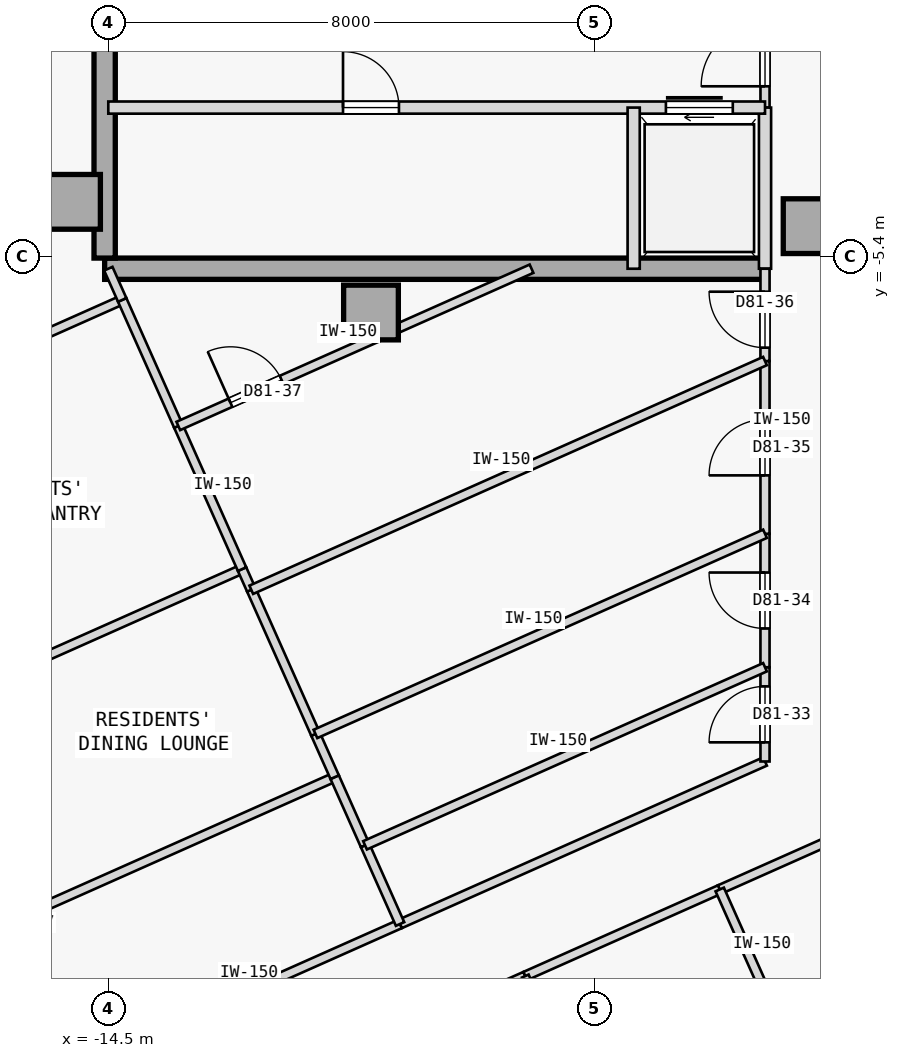
"""IFC4 building model, lengths in metres.
Left out: names, types, materials, properties, quantities, classifications, styles, units other than length and angle.
Written with IfcOpenShell. Run it as: python <this file> out.ifc"""

import sys

from ifc_helpers import new_model, si_unit, direction, frame, frame_2d, origin, origin_2d, place, context, subcontext, project, spatial, rectangle, extrude, element, fill, save


model = new_model("IFC4")
c1 = context("Model", 3, precision=1e-05, world=origin(), true_north=direction((0.0, 1.0)))
c2 = subcontext(c1, "Body", "Model", "MODEL_VIEW")
j1 = project(units=[si_unit("LENGTHUNIT", "METRE"), si_unit("PLANEANGLEUNIT", "RADIAN")], contexts=[c1])
p1 = place(None, origin())
s1 = spatial("IfcSite", under=j1, at=p1, CompositionType="ELEMENT")
p2 = place(p1, origin())
s2 = spatial("IfcBuilding", under=s1, at=p2, CompositionType="ELEMENT")
p3 = place(p2, frame((0.0, 0.0, 302.0)))
s3 = spatial("IfcBuildingStorey", under=s2, at=p3, CompositionType="ELEMENT", Elevation=302.0)
for number, where, z_axis, x_axis in (
    (1, (-15.08, -4.5, 0.0), (0.0, 0.0, 1.0), (1.0, 0.0, 0.0)),
    (2, (-10.18, -6.32, 0.0), (0.0, 0.0, 1.0), (1.0, 0.0, 0.0)),
    (3, (-2.95, -4.9, 0.0), (0.0, 0.0, 1.0), (1.0, 0.0, 0.0)),
):
    element("IfcColumn", number, at=place(p3, frame(where, z_axis=z_axis, x_axis=x_axis)), inside=s3, PredefinedType="COLUMN", context=c2, shape_type="SweptSolid", body=[
        extrude(rectangle(XDim=0.9, YDim=0.9, at=origin_2d()), origin(), (0.0, 0.0, 1.0), 3.55),
    ])
p4 = place(p3, frame((-14.56, -5.6, 0.0), z_axis=(0.0, 0.0, 1.0), x_axis=(1.0, 0.0, 0.0)))
e4 = element("IfcWall", 4, at=p4, inside=s3, PredefinedType="SHEAR", context=c2, shape_type="SweptSolid", body=[
    extrude(rectangle(XDim=10.86, YDim=0.35, at=frame_2d((5.43, 0.0))), origin(), (0.0, 0.0, 1.0), 3.145),
])
p5 = place(p3, frame((-14.56, -5.425, 0.0), z_axis=(0.0, 0.0, 1.0), x_axis=(0.0, 1.0, 0.0)))
e5 = element("IfcWall", 5, at=p5, inside=s3, PredefinedType="SHEAR", context=c2, shape_type="SweptSolid", body=[
    extrude(rectangle(XDim=10.85, YDim=0.35, at=frame_2d((5.425, 0.0))), origin(), (0.0, 0.0, 1.0), 3.145),
])
p6 = place(p3, frame((-3.7, -2.95, 0.0), z_axis=(0.0, 0.0, 1.0), x_axis=(0.0, 1.0, 0.0)))
e6 = element("IfcWall", 6, at=p6, inside=s3, PredefinedType="PARTITIONING", context=c2, shape_type="SweptSolid", body=[
    extrude(rectangle(XDim=1.8, YDim=0.15, at=frame_2d((0.9, 0.0))), origin(), (0.0, 0.0, 1.0), 3.145),
])
p7 = place(p6, frame((0.35, 0.0, 0.0)))
e7 = element("IfcOpeningElement", 7, at=p7, cuts=e6, PredefinedType="OPENING", context=c2, shape_type="SweptSolid", body=[
    extrude(rectangle(XDim=1.05, YDim=2.18, at=frame_2d((0.525, 1.09))), frame((0.0, 0.085, 0.0), z_axis=(0.0, -1.0, 0.0), x_axis=(1.0, 0.0, 0.0)), (0.0, 0.0, 1.0), 0.17),
])
p8 = place(p3, frame((-3.7, -5.6, 0.0), z_axis=(0.0, 0.0, 1.0), x_axis=(0.0, 1.0, 0.0)))
e8 = element("IfcWall", 8, at=p8, inside=s3, PredefinedType="STANDARD", context=c2, shape_type="SweptSolid", body=[
    extrude(rectangle(XDim=2.65, YDim=0.2, at=frame_2d((1.325, 0.0))), origin(), (0.0, 0.0, 1.0), 3.145),
])
p9 = place(p3, frame((-14.5, -2.95, 0.0), z_axis=(0.0, 0.0, 1.0), x_axis=(1.0, 0.0, 0.0)))
e9 = element("IfcWall", 9, at=p9, inside=s3, PredefinedType="STANDARD", context=c2, shape_type="SweptSolid", body=[
    extrude(rectangle(XDim=10.8, YDim=0.2, at=frame_2d((5.4, 0.0))), origin(), (0.0, 0.0, 1.0), 3.145),
])
p10 = place(p9, frame((9.17, 0.0, 0.0)))
e10 = element("IfcOpeningElement", 10, at=p10, cuts=e9, PredefinedType="OPENING", context=c2, shape_type="SweptSolid", body=[
    extrude(rectangle(XDim=1.1, YDim=2.15, at=frame_2d((0.55, 1.075))), frame((0.0, 0.11, 0.0), z_axis=(0.0, -1.0, 0.0), x_axis=(1.0, 0.0, 0.0)), (0.0, 0.0, 1.0), 0.22),
])
p11 = place(p9, frame((3.86, 0.0, 0.0)))
e11 = element("IfcOpeningElement", 11, at=p11, cuts=e9, PredefinedType="OPENING", context=c2, shape_type="SweptSolid", body=[
    extrude(rectangle(XDim=0.92, YDim=2.04, at=frame_2d((0.46, 1.02))), frame((0.0, 0.11, 0.0), z_axis=(0.0, -1.0, 0.0), x_axis=(1.0, 0.0, 0.0)), (0.0, 0.0, 1.0), 0.22),
])
p12 = place(p3, frame((-5.86, -5.6, 0.0), z_axis=(0.0, 0.0, 1.0), x_axis=(0.0, 1.0, 0.0)))
e12 = element("IfcWall", 12, at=p12, inside=s3, PredefinedType="STANDARD", context=c2, shape_type="SweptSolid", body=[
    extrude(rectangle(XDim=2.65, YDim=0.2, at=frame_2d((1.325, 0.0))), origin(), (0.0, 0.0, 1.0), 3.145),
])
p13 = place(p3, frame((-4.445, -15.808, 0.0), z_axis=(0.0, 0.0, 1.0), x_axis=(0.913546853922, 0.406733506966, 0.0)))
e13 = element("IfcWall", 13, at=p13, inside=s3, PredefinedType="PARTITIONING", context=c2, shape_type="SweptSolid", body=[
    extrude(rectangle(XDim=12.751, YDim=0.15, at=frame_2d((6.375, 0.0))), origin(), (0.0, 0.0, 1.0), 3.145),
])
p14 = place(p3, frame((-11.616, -19.001, 0.0), z_axis=(0.0, 0.0, 1.0), x_axis=(0.913545193015, 0.406737237438, 0.0)))
e14 = element("IfcWall", 14, at=p14, inside=s3, PredefinedType="PARTITIONING", context=c2, shape_type="SweptSolid", body=[
    extrude(rectangle(XDim=4.35, YDim=0.15, at=frame_2d((2.175, 0.0))), origin(), (0.0, 0.0, 1.0), 3.145),
])
p15 = place(p3, frame((-7.643, -17.232, 0.0), z_axis=(0.0, 0.0, 1.0), x_axis=(0.913549606868, 0.406727323635, 0.0)))
e15 = element("IfcWall", 15, at=p15, inside=s3, PredefinedType="PARTITIONING", context=c2, shape_type="SweptSolid", body=[
    extrude(rectangle(XDim=3.5, YDim=0.15, at=frame_2d((1.75, 0.0))), origin(), (0.0, 0.0, 1.0), 3.145),
])
p16 = place(p3, frame((-20.445, -21.159, 0.0), z_axis=(0.0, 0.0, 1.0), x_axis=(0.913547681516, 0.406731648137, 0.0)))
e16 = element("IfcWall", 16, at=p16, inside=s3, PredefinedType="PARTITIONING", context=c2, shape_type="SweptSolid", body=[
    extrude(rectangle(XDim=11.76, YDim=0.15, at=frame_2d((5.88, 0.0))), origin(), (0.0, 0.0, 1.0), 3.145),
])
p17 = place(p16, frame((5.42, 0.0, 0.0)))
e17 = element("IfcOpeningElement", 17, at=p17, cuts=e16, PredefinedType="OPENING", context=c2, shape_type="SweptSolid", body=[
    extrude(rectangle(XDim=0.92, YDim=2.04, at=frame_2d((0.46, 1.02))), frame((0.0, 0.085, 0.0), z_axis=(0.0, -1.0, 0.0), x_axis=(1.0, 0.0, 0.0)), (0.0, 0.0, 1.0), 0.17),
])
p18 = place(p3, frame((-9.702, -16.375, 0.0), z_axis=(0.0, 0.0, 1.0), x_axis=(0.913552389019, 0.406721074594, 0.0)))
e18 = element("IfcWall", 18, at=p18, inside=s3, PredefinedType="PARTITIONING", context=c2, shape_type="SweptSolid", body=[
    extrude(rectangle(XDim=6.57, YDim=0.15, at=frame_2d((3.285, 0.0))), origin(), (0.0, 0.0, 1.0), 3.145),
])
p19 = place(p3, frame((-3.7, -13.703, 0.0), z_axis=(0.0, 0.0, 1.0), x_axis=(-0.000157529929, 0.999999987592, 0.0)))
e19 = element("IfcWall", 19, at=p19, inside=s3, PredefinedType="PARTITIONING", context=c2, shape_type="SweptSolid", body=[
    extrude(rectangle(XDim=1.55, YDim=0.15, at=frame_2d((0.775, 0.0))), origin(), (0.0, 0.0, 1.0), 3.145),
])
p20 = place(p19, frame((0.315, 0.0, 0.0)))
e20 = element("IfcOpeningElement", 20, at=p20, cuts=e19, PredefinedType="OPENING", context=c2, shape_type="SweptSolid", body=[
    extrude(rectangle(XDim=0.92, YDim=2.04, at=frame_2d((0.46, 1.02))), frame((0.0, 0.085, 0.0), z_axis=(0.0, -1.0, 0.0), x_axis=(1.0, 0.0, 0.0)), (0.0, 0.0, 1.0), 0.17),
])
p21 = place(p3, frame((-3.7, -12.154, 0.0), z_axis=(0.0, 0.0, 1.0), x_axis=(0.000111222333, 0.999999993815, 0.0)))
e21 = element("IfcWall", 21, at=p21, inside=s3, PredefinedType="PARTITIONING", context=c2, shape_type="SweptSolid", body=[
    extrude(rectangle(XDim=2.195, YDim=0.15, at=frame_2d((1.098, 0.0))), origin(), (0.0, 0.0, 1.0), 3.145),
])
p22 = place(p21, frame((0.637, 0.0, 0.0)))
e22 = element("IfcOpeningElement", 22, at=p22, cuts=e21, PredefinedType="OPENING", context=c2, shape_type="SweptSolid", body=[
    extrude(rectangle(XDim=0.92, YDim=2.04, at=frame_2d((0.46, 1.02))), frame((0.0, 0.085, 0.0), z_axis=(0.0, -1.0, 0.0), x_axis=(1.0, 0.0, 0.0)), (0.0, 0.0, 1.0), 0.17),
])
p23 = place(p3, frame((-3.7, -9.958, 0.0), z_axis=(0.0, 0.0, 1.0), x_axis=(-0.000171909917, 0.999999985223, 0.0)))
e23 = element("IfcWall", 23, at=p23, inside=s3, PredefinedType="PARTITIONING", context=c2, shape_type="SweptSolid", body=[
    extrude(rectangle(XDim=2.84, YDim=0.15, at=frame_2d((1.42, 0.0))), origin(), (0.0, 0.0, 1.0), 3.145),
])
p24 = place(p23, frame((0.96, 0.0, 0.0)))
e24 = element("IfcOpeningElement", 24, at=p24, cuts=e23, PredefinedType="OPENING", context=c2, shape_type="SweptSolid", body=[
    extrude(rectangle(XDim=0.92, YDim=2.04, at=frame_2d((0.46, 1.02))), frame((0.0, 0.085, 0.0), z_axis=(0.0, -1.0, 0.0), x_axis=(1.0, 0.0, 0.0)), (0.0, 0.0, 1.0), 0.17),
])
p25 = place(p3, frame((-3.7, -7.118, 0.0), z_axis=(0.0, 0.0, 1.0), x_axis=(0.000321543392, 0.999999948305, 0.0)))
e25 = element("IfcWall", 25, at=p25, inside=s3, PredefinedType="PARTITIONING", context=c2, shape_type="SweptSolid", body=[
    extrude(rectangle(XDim=1.519, YDim=0.15, at=frame_2d((0.759, 0.0))), origin(), (0.0, 0.0, 1.0), 3.145),
])
p26 = place(p25, frame((0.22, 0.0, 0.0)))
e26 = element("IfcOpeningElement", 26, at=p26, cuts=e25, PredefinedType="OPENING", context=c2, shape_type="SweptSolid", body=[
    extrude(rectangle(XDim=0.92, YDim=2.04, at=frame_2d((0.46, 1.02))), frame((0.0, 0.085, 0.0), z_axis=(0.0, -1.0, 0.0), x_axis=(1.0, 0.0, 0.0)), (0.0, 0.0, 1.0), 0.17),
])
p27 = place(p3, frame((-3.55, -17.818, 0.0), z_axis=(0.0, 0.0, 1.0), x_axis=(-0.406725294076, 0.913550510459, 0.0)))
e27 = element("IfcWall", 27, at=p27, inside=s3, PredefinedType="PARTITIONING", context=c2, shape_type="SweptSolid", body=[
    extrude(rectangle(XDim=2.2, YDim=0.15, at=frame_2d((1.1, 0.0))), origin(), (0.0, 0.0, 1.0), 3.145),
])
p28 = place(p3, frame((-6.748, -19.242, 0.0), z_axis=(0.0, 0.0, 1.0), x_axis=(-0.406725294076, 0.913550510459, 0.0)))
e28 = element("IfcWall", 28, at=p28, inside=s3, PredefinedType="PARTITIONING", context=c2, shape_type="SweptSolid", body=[
    extrude(rectangle(XDim=2.2, YDim=0.12, at=frame_2d((1.1, 0.0))), origin(), (0.0, 0.0, 1.0), 3.145),
])
p29 = place(p3, frame((-21.52, -18.744, 0.0), z_axis=(0.0, 0.0, 1.0), x_axis=(0.913539967617, 0.406748973651, 0.0)))
e29 = element("IfcWall", 29, at=p29, inside=s3, PredefinedType="PARTITIONING", context=c2, shape_type="SweptSolid", body=[
    extrude(rectangle(XDim=11.76, YDim=0.15, at=frame_2d((5.88, 0.0))), origin(), (0.0, 0.0, 1.0), 3.145),
])
p30 = place(p29, frame((5.42, 0.0, 0.0)))
e30 = element("IfcOpeningElement", 30, at=p30, cuts=e29, PredefinedType="OPENING", context=c2, shape_type="SweptSolid", body=[
    extrude(rectangle(XDim=0.92, YDim=2.04, at=frame_2d((0.46, 1.02))), frame((0.0, 0.085, 0.0), z_axis=(0.0, -1.0, 0.0), x_axis=(1.0, 0.0, 0.0)), (0.0, 0.0, 1.0), 0.17),
])
p31 = place(p3, frame((-9.702, -16.375, 0.0), z_axis=(0.0, 0.0, 1.0), x_axis=(-0.406762319034, 0.913534025537, 0.0)))
e31 = element("IfcWall", 31, at=p31, inside=s3, PredefinedType="PARTITIONING", context=c2, shape_type="SweptSolid", body=[
    extrude(rectangle(XDim=1.416, YDim=0.15, at=frame_2d((0.708, 0.0))), origin(), (0.0, 0.0, 1.0), 3.145),
])
p32 = place(p3, frame((-10.278, -15.082, 0.0), z_axis=(0.0, 0.0, 1.0), x_axis=(-0.406655262741, 0.913581686159, 0.0)))
e32 = element("IfcWall", 32, at=p32, inside=s3, PredefinedType="PARTITIONING", context=c2, shape_type="SweptSolid", body=[
    extrude(rectangle(XDim=1.227, YDim=0.15, at=frame_2d((0.614, 0.0))), origin(), (0.0, 0.0, 1.0), 3.145),
])
p33 = place(p3, frame((-23.043, -15.323, 0.0), z_axis=(0.0, 0.0, 1.0), x_axis=(0.913547681516, 0.406731648137, 0.0)))
e33 = element("IfcWall", 33, at=p33, inside=s3, PredefinedType="PARTITIONING", context=c2, shape_type="SweptSolid", body=[
    extrude(rectangle(XDim=11.76, YDim=0.15, at=frame_2d((5.88, 0.0))), origin(), (0.0, 0.0, 1.0), 3.145),
])
p34 = place(p33, frame((5.42, 0.0, 0.0)))
e34 = element("IfcOpeningElement", 34, at=p34, cuts=e33, PredefinedType="OPENING", context=c2, shape_type="SweptSolid", body=[
    extrude(rectangle(XDim=0.92, YDim=2.04, at=frame_2d((0.46, 1.02))), frame((0.0, 0.085, 0.0), z_axis=(0.0, -1.0, 0.0), x_axis=(1.0, 0.0, 0.0)), (0.0, 0.0, 1.0), 0.17),
])
p35 = place(p3, frame((-10.777, -13.961, 0.0), z_axis=(0.0, 0.0, 1.0), x_axis=(-0.406720744325, 0.913552536057, 0.0)))
e35 = element("IfcWall", 35, at=p35, inside=s3, PredefinedType="PARTITIONING", context=c2, shape_type="SweptSolid", body=[
    extrude(rectangle(XDim=0.778, YDim=0.15, at=frame_2d((0.389, 0.0))), origin(), (0.0, 0.0, 1.0), 3.145),
])
p36 = place(p3, frame((-11.093, -13.25, 0.0), z_axis=(0.0, 0.0, 1.0), x_axis=(-0.406723252866, 0.91355141923, 0.0)))
e36 = element("IfcWall", 36, at=p36, inside=s3, PredefinedType="PARTITIONING", context=c2, shape_type="SweptSolid", body=[
    extrude(rectangle(XDim=2.595, YDim=0.15, at=frame_2d((1.297, 0.0))), origin(), (0.0, 0.0, 1.0), 3.145),
])
p37 = place(p3, frame((-12.149, -10.88, 0.0), z_axis=(0.0, 0.0, 1.0), x_axis=(-0.406868995548, 0.913486519037, 0.0)))
e37 = element("IfcWall", 37, at=p37, inside=s3, PredefinedType="PARTITIONING", context=c2, shape_type="SweptSolid", body=[
    extrude(rectangle(XDim=0.372, YDim=0.15, at=frame_2d((0.186, 0.0))), origin(), (0.0, 0.0, 1.0), 3.145),
])
p38 = place(p3, frame((-25.014, -10.896, 0.0), z_axis=(0.0, 0.0, 1.0), x_axis=(0.913544247064, 0.406739362069, 0.0)))
e38 = element("IfcWall", 38, at=p38, inside=s3, PredefinedType="PARTITIONING", context=c2, shape_type="SweptSolid", body=[
    extrude(rectangle(XDim=11.76, YDim=0.15, at=frame_2d((5.88, 0.0))), origin(), (0.0, 0.0, 1.0), 3.145),
])
p39 = place(p38, frame((5.42, 0.0, 0.0)))
e39 = element("IfcOpeningElement", 39, at=p39, cuts=e38, PredefinedType="OPENING", context=c2, shape_type="SweptSolid", body=[
    extrude(rectangle(XDim=0.92, YDim=2.04, at=frame_2d((0.46, 1.02))), frame((0.0, 0.085, 0.0), z_axis=(0.0, -1.0, 0.0), x_axis=(1.0, 0.0, 0.0)), (0.0, 0.0, 1.0), 0.17),
])
p40 = place(p3, frame((-12.3, -10.54, 0.0), z_axis=(0.0, 0.0, 1.0), x_axis=(-0.406788806475, 0.913522231216, 0.0)))
e40 = element("IfcWall", 40, at=p40, inside=s3, PredefinedType="PARTITIONING", context=c2, shape_type="SweptSolid", body=[
    extrude(rectangle(XDim=2.577, YDim=0.15, at=frame_2d((1.289, 0.0))), origin(), (0.0, 0.0, 1.0), 3.145),
])
p41 = place(p3, frame((-13.348, -8.186, 0.0), z_axis=(0.0, 0.0, 1.0), x_axis=(-0.40673740295, 0.913545119324, 0.0)))
e41 = element("IfcWall", 41, at=p41, inside=s3, PredefinedType="PARTITIONING", context=c2, shape_type="SweptSolid", body=[
    extrude(rectangle(XDim=2.269, YDim=0.15, at=frame_2d((1.134, 0.0))), origin(), (0.0, 0.0, 1.0), 3.145),
])
p42 = place(p3, frame((-14.271, -6.113, 0.0), z_axis=(0.0, 0.0, 1.0), x_axis=(-0.406622099206, 0.913596447255, 0.0)))
e42 = element("IfcWall", 42, at=p42, inside=s3, PredefinedType="PARTITIONING", context=c2, shape_type="SweptSolid", body=[
    extrude(rectangle(XDim=0.562, YDim=0.15, at=frame_2d((0.281, 0.0))), origin(), (0.0, 0.0, 1.0), 3.145),
])
p43 = place(p3, frame((-10.278, -15.082, 0.0), z_axis=(0.0, 0.0, 1.0), x_axis=(0.913549882956, 0.406726703513, 0.0)))
e43 = element("IfcWall", 43, at=p43, inside=s3, PredefinedType="PARTITIONING", context=c2, shape_type="SweptSolid", body=[
    extrude(rectangle(XDim=7.2, YDim=0.15, at=frame_2d((3.6, 0.0))), origin(), (0.0, 0.0, 1.0), 3.145),
])
p44 = place(p3, frame((-11.093, -13.25, 0.0), z_axis=(0.0, 0.0, 1.0), x_axis=(0.913543891457, 0.406740160767, 0.0)))
e44 = element("IfcWall", 44, at=p44, inside=s3, PredefinedType="PARTITIONING", context=c2, shape_type="SweptSolid", body=[
    extrude(rectangle(XDim=8.093, YDim=0.15, at=frame_2d((4.046, 0.0))), origin(), (0.0, 0.0, 1.0), 3.145),
])
p45 = place(p3, frame((-12.149, -10.88, 0.0), z_axis=(0.0, 0.0, 1.0), x_axis=(0.913542450291, 0.406743397631, 0.0)))
e45 = element("IfcWall", 45, at=p45, inside=s3, PredefinedType="PARTITIONING", context=c2, shape_type="SweptSolid", body=[
    extrude(rectangle(XDim=9.248, YDim=0.15, at=frame_2d((4.624, 0.0))), origin(), (0.0, 0.0, 1.0), 3.145),
])
p46 = place(p3, frame((-13.348, -8.186, 0.0), z_axis=(0.0, 0.0, 1.0), x_axis=(0.913551673432, 0.406722681896, 0.0)))
e46 = element("IfcWall", 46, at=p46, inside=s3, PredefinedType="PARTITIONING", context=c2, shape_type="SweptSolid", body=[
    extrude(rectangle(XDim=6.358, YDim=0.15, at=frame_2d((3.179, 0.0))), origin(), (0.0, 0.0, 1.0), 3.145),
])
p47 = place(p46, frame((0.939, 0.0, 0.0)))
e47 = element("IfcOpeningElement", 47, at=p47, cuts=e46, PredefinedType="OPENING", context=c2, shape_type="SweptSolid", body=[
    extrude(rectangle(XDim=0.92, YDim=2.04, at=frame_2d((0.46, 1.02))), frame((0.0, 0.085, 0.0), z_axis=(0.0, -1.0, 0.0), x_axis=(1.0, 0.0, 0.0)), (0.0, 0.0, 1.0), 0.17),
])
p48 = place(p7, origin())
e48 = element("IfcDoor", 48, at=p48, inside=s3, OperationType="SINGLE_SWING_LEFT", PredefinedType="DOOR", context=c2, shape_type="SweptSolid", body=[
    extrude(rectangle(XDim=1.05, YDim=2.18, at=frame_2d((0.525, 1.09))), frame((0.0, 0.025, 0.0), z_axis=(0.0, -1.0, 0.0), x_axis=(1.0, 0.0, 0.0)), (0.0, 0.0, 1.0), 0.05),
])
fill(e7, e48)
p49 = place(p10, origin())
e49 = element("IfcDoor", 49, at=p49, inside=s3, OperationType="SLIDING_TO_RIGHT", PredefinedType="DOOR", context=c2, shape_type="SweptSolid", body=[
    extrude(rectangle(XDim=1.1, YDim=2.15, at=frame_2d((0.55, 1.075))), frame((0.0, 0.025, 0.0), z_axis=(0.0, -1.0, 0.0), x_axis=(1.0, 0.0, 0.0)), (0.0, 0.0, 1.0), 0.05),
])
fill(e10, e49)
p50 = place(p11, origin())
e50 = element("IfcDoor", 50, at=p50, inside=s3, OperationType="SINGLE_SWING_LEFT", PredefinedType="DOOR", context=c2, shape_type="SweptSolid", body=[
    extrude(rectangle(XDim=0.92, YDim=2.04, at=frame_2d((0.46, 1.02))), frame((0.0, 0.025, 0.0), z_axis=(0.0, -1.0, 0.0), x_axis=(1.0, 0.0, 0.0)), (0.0, 0.0, 1.0), 0.05),
])
fill(e11, e50)
p51 = place(p20, origin())
e51 = element("IfcDoor", 51, at=p51, inside=s3, OperationType="SINGLE_SWING_LEFT", PredefinedType="DOOR", context=c2, shape_type="SweptSolid", body=[
    extrude(rectangle(XDim=0.92, YDim=2.04, at=frame_2d((0.46, 1.02))), frame((0.0, 0.025, 0.0), z_axis=(0.0, -1.0, 0.0), x_axis=(1.0, 0.0, 0.0)), (0.0, 0.0, 1.0), 0.05),
])
fill(e20, e51)
p52 = place(p22, origin())
e52 = element("IfcDoor", 52, at=p52, inside=s3, OperationType="SINGLE_SWING_RIGHT", PredefinedType="DOOR", context=c2, shape_type="SweptSolid", body=[
    extrude(rectangle(XDim=0.92, YDim=2.04, at=frame_2d((0.46, 1.02))), frame((0.0, 0.025, 0.0), z_axis=(0.0, -1.0, 0.0), x_axis=(1.0, 0.0, 0.0)), (0.0, 0.0, 1.0), 0.05),
])
fill(e22, e52)
p53 = place(p24, origin())
e53 = element("IfcDoor", 53, at=p53, inside=s3, OperationType="SINGLE_SWING_LEFT", PredefinedType="DOOR", context=c2, shape_type="SweptSolid", body=[
    extrude(rectangle(XDim=0.92, YDim=2.04, at=frame_2d((0.46, 1.02))), frame((0.0, 0.025, 0.0), z_axis=(0.0, -1.0, 0.0), x_axis=(1.0, 0.0, 0.0)), (0.0, 0.0, 1.0), 0.05),
])
fill(e24, e53)
p54 = place(p26, origin())
e54 = element("IfcDoor", 54, at=p54, inside=s3, OperationType="SINGLE_SWING_RIGHT", PredefinedType="DOOR", context=c2, shape_type="SweptSolid", body=[
    extrude(rectangle(XDim=0.92, YDim=2.04, at=frame_2d((0.46, 1.02))), frame((0.0, 0.025, 0.0), z_axis=(0.0, -1.0, 0.0), x_axis=(1.0, 0.0, 0.0)), (0.0, 0.0, 1.0), 0.05),
])
fill(e26, e54)
p55 = place(p47, origin())
e55 = element("IfcDoor", 55, at=p55, inside=s3, OperationType="SINGLE_SWING_LEFT", PredefinedType="DOOR", context=c2, shape_type="SweptSolid", body=[
    extrude(rectangle(XDim=0.92, YDim=2.04, at=frame_2d((0.46, 1.02))), frame((0.0, 0.025, 0.0), z_axis=(0.0, -1.0, 0.0), x_axis=(1.0, 0.0, 0.0)), (0.0, 0.0, 1.0), 0.05),
])
fill(e47, e55)
save(model, sys.argv[1])
